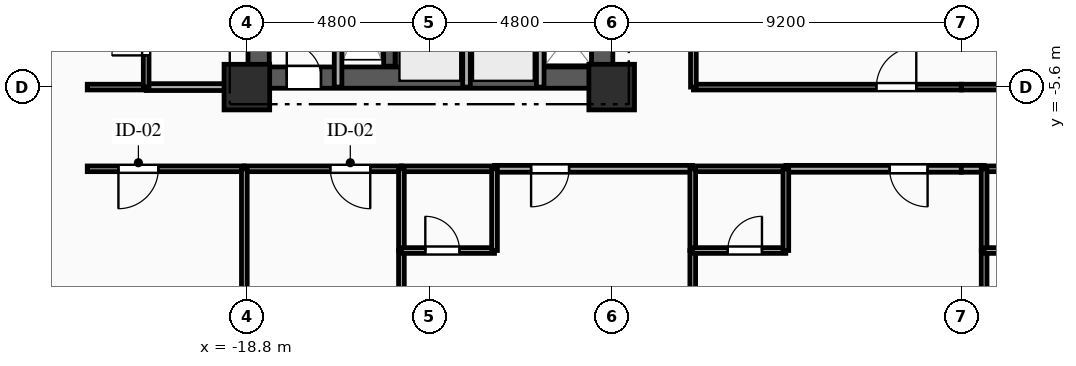
"""IFC4 building model, lengths in metres.
Left out: names, types, materials, properties, quantities, classifications, styles, units other than length and angle.
Written with IfcOpenShell. Run it as: python <this file> out.ifc"""

import sys

from ifc_helpers import new_model, si_unit, direction, frame, frame_2d, origin, origin_2d, place, context, subcontext, project, spatial, rectangle, extrude, element, fill, save


model = new_model("IFC4")
c1 = context("Model", 3, precision=1e-05, world=origin(), true_north=direction((0.0, 1.0)))
c2 = subcontext(c1, "Body", "Model", "MODEL_VIEW")
j1 = project(units=[si_unit("LENGTHUNIT", "METRE"), si_unit("PLANEANGLEUNIT", "RADIAN")], contexts=[c1])
p1 = place(None, origin())
s1 = spatial("IfcSite", under=j1, at=p1, CompositionType="ELEMENT")
p2 = place(p1, origin())
s2 = spatial("IfcBuilding", under=s1, at=p2, CompositionType="ELEMENT")
p3 = place(p2, frame((0.0, 0.0, 37.05)))
s3 = spatial("IfcBuildingStorey", under=s2, at=p3, CompositionType="ELEMENT", Elevation=37.05)
for number, where, z_axis, x_axis in (
    (1, (-18.8, -5.6, 0.0), (0.0, 0.0, 1.0), (1.0, 0.0, 0.0)),
    (2, (-9.2, -5.6, 0.0), (0.0, 0.0, 1.0), (1.0, 0.0, 0.0)),
):
    element("IfcColumn", number, at=place(p3, frame(where, z_axis=z_axis, x_axis=x_axis)), inside=s3, PredefinedType="COLUMN", context=c2, shape_type="SweptSolid", body=[
        extrude(rectangle(XDim=1.2, YDim=1.2, at=origin_2d()), origin(), (0.0, 0.0, 1.0), 3.35),
    ])
p4 = place(p3, frame((-18.8, -5.35, 0.0), z_axis=(0.0, 0.0, 1.0), x_axis=(1.0, 0.0, 0.0)))
e3 = element("IfcWall", 3, at=p4, inside=s3, PredefinedType="SHEAR", context=c2, shape_type="SweptSolid", body=[
    extrude(rectangle(XDim=9.6, YDim=0.56, at=frame_2d((4.8, 0.0))), origin(), (0.0, 0.0, 1.0), 3.035),
])
p5 = place(p4, frame((1.05, 0.0, 0.0)))
e4 = element("IfcOpeningElement", 4, at=p5, cuts=e3, PredefinedType="OPENING", context=c2, shape_type="SweptSolid", body=[
    extrude(rectangle(XDim=0.9, YDim=2.1, at=frame_2d((0.45, 1.05))), frame((0.0, 0.29, 0.0), z_axis=(0.0, -1.0, 0.0), x_axis=(1.0, 0.0, 0.0)), (0.0, 0.0, 1.0), 0.58),
])
p6 = place(p3, frame((-18.49, -5.05, 0.0), z_axis=(0.0, 0.0, 1.0), x_axis=(0.0, 1.0, 0.0)))
e5 = element("IfcWall", 5, at=p6, inside=s3, PredefinedType="SHEAR", context=c2, shape_type="SweptSolid", body=[
    extrude(rectangle(XDim=10.1, YDim=0.56, at=frame_2d((5.05, 0.0))), origin(), (0.0, 0.0, 1.0), 3.035),
])
p7 = place(p3, frame((-9.45, -5.05, 0.0), z_axis=(0.0, 0.0, 1.0), x_axis=(0.0, 1.0, 0.0)))
e6 = element("IfcWall", 6, at=p7, inside=s3, PredefinedType="SHEAR", context=c2, shape_type="SweptSolid", body=[
    extrude(rectangle(XDim=10.1, YDim=0.56, at=frame_2d((5.05, 0.0))), origin(), (0.0, 0.0, 1.0), 3.035),
])
p8 = place(p7, frame((7.15, 0.0, 0.0)))
e7 = element("IfcOpeningElement", 7, at=p8, cuts=e6, PredefinedType="OPENING", context=c2, shape_type="SweptSolid", body=[
    extrude(rectangle(XDim=0.9, YDim=2.1, at=frame_2d((0.45, 1.05))), frame((0.0, 0.29, 0.0), z_axis=(0.0, -1.0, 0.0), x_axis=(1.0, 0.0, 0.0)), (0.0, 0.0, 1.0), 0.58),
])
p9 = place(p7, frame((2.4, 0.0, 0.0)))
e8 = element("IfcOpeningElement", 8, at=p9, cuts=e6, PredefinedType="OPENING", context=c2, shape_type="SweptSolid", body=[
    extrude(rectangle(XDim=1.2, YDim=2.15, at=frame_2d((0.6, 1.075))), frame((0.0, 0.29, 0.0), z_axis=(0.0, -1.0, 0.0), x_axis=(1.0, 0.0, 0.0)), (0.0, 0.0, 1.0), 0.58),
])
p10 = place(p3, frame((-15.05, -5.05, 0.0), z_axis=(0.0, 0.0, 1.0), x_axis=(0.0, 1.0, 0.0)))
e9 = element("IfcWall", 9, at=p10, inside=s3, PredefinedType="SHEAR", context=c2, shape_type="SweptSolid", body=[
    extrude(rectangle(XDim=10.1, YDim=0.3, at=frame_2d((5.05, 0.0))), origin(), (0.0, 0.0, 1.0), 3.035),
])
p11 = place(p3, frame((-16.4, -5.6, 0.0), z_axis=(0.0, 0.0, 1.0), x_axis=(0.0, 1.0, 0.0)))
e10 = element("IfcWall", 10, at=p11, inside=s3, PredefinedType="PARTITIONING", context=c2, shape_type="SweptSolid", body=[
    extrude(rectangle(XDim=3.49, YDim=0.2, at=frame_2d((1.745, 0.0))), origin(), (0.0, 0.0, 1.0), 3.035),
])
for number, where, z_axis, x_axis in (
    (11, (-13.02, -5.6, 0.0), (0.0, 0.0, 1.0), (0.0, 1.0, 0.0)),
    (12, (-11.08, -5.6, 0.0), (0.0, 0.0, 1.0), (0.0, 1.0, 0.0)),
):
    element("IfcWall", number, at=place(p3, frame(where, z_axis=z_axis, x_axis=x_axis)), inside=s3, PredefinedType="PARTITIONING", context=c2, shape_type="SweptSolid", body=[
        extrude(rectangle(XDim=2.25, YDim=0.2, at=frame_2d((1.125, 0.0))), origin(), (0.0, 0.0, 1.0), 3.035),
    ])
p12 = place(p3, frame((-21.45, -5.6, 0.0), z_axis=(0.0, 0.0, 1.0), x_axis=(1.0, 0.0, 0.0)))
e13 = element("IfcWall", 13, at=p12, inside=s3, PredefinedType="PARTITIONING", context=c2, shape_type="SweptSolid", body=[
    extrude(rectangle(XDim=2.65, YDim=0.18, at=frame_2d((1.325, 0.0))), origin(), (0.0, 0.0, 1.0), 3.035),
])
p13 = place(p3, frame((-23.0, -5.6, 0.0), z_axis=(0.0, 0.0, 1.0), x_axis=(1.0, 0.0, 0.0)))
e14 = element("IfcWall", 14, at=p13, inside=s3, PredefinedType="PLUMBINGWALL", context=c2, shape_type="SweptSolid", body=[
    extrude(rectangle(XDim=1.55, YDim=0.15, at=frame_2d((0.775, 0.0))), origin(), (0.0, 0.0, 1.0), 3.035),
])
p14 = place(p3, frame((-18.866, -7.75, 0.0), z_axis=(0.0, 0.0, 1.0), x_axis=(-1.0, 0.0, 0.0)))
e15 = element("IfcWall", 15, at=p14, inside=s3, PredefinedType="PARTITIONING", context=c2, shape_type="SweptSolid", body=[
    extrude(rectangle(XDim=4.134, YDim=0.15, at=frame_2d((2.067, 0.0))), origin(), (0.0, 0.0, 1.0), 3.035),
])
p15 = place(p14, frame((2.263, 0.0, 0.0)))
e16 = element("IfcOpeningElement", 16, at=p15, cuts=e15, PredefinedType="OPENING", context=c2, shape_type="SweptSolid", body=[
    extrude(rectangle(XDim=1.05, YDim=2.15, at=frame_2d((0.525, 1.075))), frame((0.0, 0.085, 0.0), z_axis=(0.0, -1.0, 0.0), x_axis=(1.0, 0.0, 0.0)), (0.0, 0.0, 1.0), 0.17),
])
p16 = place(p3, frame((-14.733, -7.75, 0.0), z_axis=(0.0, 0.0, 1.0), x_axis=(-1.0, 0.0, 0.0)))
e17 = element("IfcWall", 17, at=p16, inside=s3, PredefinedType="PARTITIONING", context=c2, shape_type="SweptSolid", body=[
    extrude(rectangle(XDim=4.134, YDim=0.15, at=frame_2d((2.067, 0.0))), origin(), (0.0, 0.0, 1.0), 3.035),
])
p17 = place(p16, frame((0.82, 0.0, 0.0)))
e18 = element("IfcOpeningElement", 18, at=p17, cuts=e17, PredefinedType="OPENING", context=c2, shape_type="SweptSolid", body=[
    extrude(rectangle(XDim=1.05, YDim=2.15, at=frame_2d((0.525, 1.075))), frame((0.0, 0.085, 0.0), z_axis=(0.0, -1.0, 0.0), x_axis=(1.0, 0.0, 0.0)), (0.0, 0.0, 1.0), 0.17),
])
p18 = place(p3, frame((-7.067, -7.75, 0.0), z_axis=(0.0, 0.0, 1.0), x_axis=(-1.0, 0.0, 0.0)))
e19 = element("IfcWall", 19, at=p18, inside=s3, PredefinedType="PARTITIONING", context=c2, shape_type="SweptSolid", body=[
    extrude(rectangle(XDim=5.216, YDim=0.18, at=frame_2d((2.608, 0.0))), origin(), (0.0, 0.0, 1.0), 3.035),
])
p19 = place(p18, frame((3.254, 0.0, 0.0)))
e20 = element("IfcOpeningElement", 20, at=p19, cuts=e19, PredefinedType="OPENING", context=c2, shape_type="SweptSolid", body=[
    extrude(rectangle(XDim=1.0, YDim=2.15, at=frame_2d((0.5, 1.075))), frame((0.0, 0.1, 0.0), z_axis=(0.0, -1.0, 0.0), x_axis=(1.0, 0.0, 0.0)), (0.0, 0.0, 1.0), 0.2),
])
p20 = place(p3, frame((-12.283, -7.75, 0.0), z_axis=(0.0, 0.0, 1.0), x_axis=(-1.0, 0.0, 0.0)))
e21 = element("IfcWall", 21, at=p20, inside=s3, PredefinedType="PLUMBINGWALL", context=c2, shape_type="SweptSolid", body=[
    extrude(rectangle(XDim=2.45, YDim=0.15, at=frame_2d((1.225, 0.0))), origin(), (0.0, 0.0, 1.0), 3.035),
])
p21 = place(p3, frame((0.0, -7.75, 0.0), z_axis=(0.0, 0.0, 1.0), x_axis=(-1.0, 0.0, 0.0)))
e22 = element("IfcWall", 22, at=p21, inside=s3, PredefinedType="PARTITIONING", context=c2, shape_type="SweptSolid", body=[
    extrude(rectangle(XDim=4.617, YDim=0.18, at=frame_2d((2.309, 0.0))), origin(), (0.0, 0.0, 1.0), 3.035),
])
p22 = place(p21, frame((0.887, 0.0, 0.0)))
e23 = element("IfcOpeningElement", 23, at=p22, cuts=e22, PredefinedType="OPENING", context=c2, shape_type="SweptSolid", body=[
    extrude(rectangle(XDim=1.0, YDim=2.15, at=frame_2d((0.5, 1.075))), frame((0.0, 0.1, 0.0), z_axis=(0.0, -1.0, 0.0), x_axis=(1.0, 0.0, 0.0)), (0.0, 0.0, 1.0), 0.2),
])
p23 = place(p3, frame((-4.617, -7.75, 0.0), z_axis=(0.0, 0.0, 1.0), x_axis=(-1.0, 0.0, 0.0)))
e24 = element("IfcWall", 24, at=p23, inside=s3, PredefinedType="PLUMBINGWALL", context=c2, shape_type="SweptSolid", body=[
    extrude(rectangle(XDim=2.45, YDim=0.15, at=frame_2d((1.225, 0.0))), origin(), (0.0, 0.0, 1.0), 3.035),
])
p24 = place(p3, frame((-7.05, -5.6, 0.0), z_axis=(0.0, 0.0, 1.0), x_axis=(1.0, 0.0, 0.0)))
e25 = element("IfcWall", 25, at=p24, inside=s3, PredefinedType="PARTITIONING", context=c2, shape_type="SweptSolid", body=[
    extrude(rectangle(XDim=7.05, YDim=0.15, at=frame_2d((3.525, 0.0))), origin(), (0.0, 0.0, 1.0), 2.52),
])
p25 = place(p24, frame((4.815, 0.0, 0.0)))
e26 = element("IfcOpeningElement", 26, at=p25, cuts=e25, PredefinedType="OPENING", context=c2, shape_type="SweptSolid", body=[
    extrude(rectangle(XDim=1.05, YDim=2.15, at=frame_2d((0.525, 1.075))), frame((0.0, 0.085, 0.0), z_axis=(0.0, -1.0, 0.0), x_axis=(1.0, 0.0, 0.0)), (0.0, 0.0, 1.0), 0.17),
])
p26 = place(p3, frame((0.6, -7.75, 0.0), z_axis=(0.0, 0.0, 1.0), x_axis=(-1.0, 0.0, 0.0)))
e27 = element("IfcWall", 27, at=p26, inside=s3, PredefinedType="PARTITIONING", context=c2, shape_type="SweptSolid", body=[
    extrude(rectangle(XDim=0.6, YDim=0.18, at=frame_2d((0.3, 0.0))), origin(), (0.0, 0.0, 1.0), 3.035),
])
p27 = place(p3, frame((3.05, -7.75, 0.0), z_axis=(0.0, 0.0, 1.0), x_axis=(-1.0, 0.0, 0.0)))
e28 = element("IfcWall", 28, at=p27, inside=s3, PredefinedType="PLUMBINGWALL", context=c2, shape_type="SweptSolid", body=[
    extrude(rectangle(XDim=2.45, YDim=0.15, at=frame_2d((1.225, 0.0))), origin(), (0.0, 0.0, 1.0), 3.035),
])
p28 = place(p3, frame((0.0, -5.6, 0.0), z_axis=(0.0, 0.0, 1.0), x_axis=(1.0, 0.0, 0.0)))
e29 = element("IfcWall", 29, at=p28, inside=s3, PredefinedType="PARTITIONING", context=c2, shape_type="SweptSolid", body=[
    extrude(rectangle(XDim=7.05, YDim=0.15, at=frame_2d((3.525, 0.0))), origin(), (0.0, 0.0, 1.0), 2.52),
])
p29 = place(p3, frame((-7.05, 1.45, 0.0), z_axis=(0.0, 0.0, 1.0), x_axis=(0.0, -1.0, 0.0)))
e30 = element("IfcWall", 30, at=p29, inside=s3, PredefinedType="PARTITIONING", context=c2, shape_type="SweptSolid", body=[
    extrude(rectangle(XDim=7.05, YDim=0.15, at=frame_2d((3.525, 0.0))), origin(), (0.0, 0.0, 1.0), 3.035),
])
p30 = place(p3, frame((-21.45, -5.6, 0.0), z_axis=(0.0, 0.0, 1.0), x_axis=(0.0, 1.0, 0.0)))
e31 = element("IfcWall", 31, at=p30, inside=s3, PredefinedType="PLUMBINGWALL", context=c2, shape_type="SweptSolid", body=[
    extrude(rectangle(XDim=2.35, YDim=0.15, at=frame_2d((1.175, 0.0))), origin(), (0.0, 0.0, 1.0), 3.035),
])
p31 = place(p30, frame((0.834, 0.0, 0.0)))
e32 = element("IfcOpeningElement", 32, at=p31, cuts=e31, PredefinedType="OPENING", context=c2, shape_type="SweptSolid", body=[
    extrude(rectangle(XDim=0.9, YDim=2.1, at=frame_2d((0.45, 1.05))), frame((0.0, 0.085, 0.0), z_axis=(0.0, -1.0, 0.0), x_axis=(1.0, 0.0, 0.0)), (0.0, 0.0, 1.0), 0.17),
])
p32 = place(p3, frame((-18.866, -7.75, 0.0), z_axis=(0.0, 0.0, 1.0), x_axis=(0.0, -1.0, 0.0)))
e33 = element("IfcWall", 33, at=p32, inside=s3, PredefinedType="PARTITIONING", context=c2, shape_type="SweptSolid", body=[
    extrude(rectangle(XDim=11.65, YDim=0.15, at=frame_2d((5.825, 0.0))), origin(), (0.0, 0.0, 1.0), 2.52),
])
p33 = place(p3, frame((-14.733, -9.9, 0.0), z_axis=(0.0, 0.0, 1.0), x_axis=(0.0, -1.0, 0.0)))
e34 = element("IfcWall", 34, at=p33, inside=s3, PredefinedType="PARTITIONING", context=c2, shape_type="SweptSolid", body=[
    extrude(rectangle(XDim=9.5, YDim=0.15, at=frame_2d((4.75, 0.0))), origin(), (0.0, 0.0, 1.0), 3.035),
])
p34 = place(p3, frame((-14.733, -7.75, 0.0), z_axis=(0.0, 0.0, 1.0), x_axis=(0.0, -1.0, 0.0)))
e35 = element("IfcWall", 35, at=p34, inside=s3, PredefinedType="PLUMBINGWALL", context=c2, shape_type="SweptSolid", body=[
    extrude(rectangle(XDim=2.15, YDim=0.15, at=frame_2d((1.075, 0.0))), origin(), (0.0, 0.0, 1.0), 3.035),
])
p35 = place(p3, frame((-14.733, -9.9, 0.0), z_axis=(0.0, 0.0, 1.0), x_axis=(1.0, 0.0, 0.0)))
e36 = element("IfcWall", 36, at=p35, inside=s3, PredefinedType="PLUMBINGWALL", context=c2, shape_type="SweptSolid", body=[
    extrude(rectangle(XDim=2.45, YDim=0.15, at=frame_2d((1.225, 0.0))), origin(), (0.0, 0.0, 1.0), 3.035),
])
p36 = place(p35, frame((0.629, 0.0, 0.0)))
e37 = element("IfcOpeningElement", 37, at=p36, cuts=e36, PredefinedType="OPENING", context=c2, shape_type="SweptSolid", body=[
    extrude(rectangle(XDim=0.9, YDim=2.1, at=frame_2d((0.45, 1.05))), frame((0.0, 0.085, 0.0), z_axis=(0.0, -1.0, 0.0), x_axis=(1.0, 0.0, 0.0)), (0.0, 0.0, 1.0), 0.17),
])
p37 = place(p3, frame((-12.283, -9.9, 0.0), z_axis=(0.0, 0.0, 1.0), x_axis=(0.0, 1.0, 0.0)))
e38 = element("IfcWall", 38, at=p37, inside=s3, PredefinedType="PLUMBINGWALL", context=c2, shape_type="SweptSolid", body=[
    extrude(rectangle(XDim=2.15, YDim=0.15, at=frame_2d((1.075, 0.0))), origin(), (0.0, 0.0, 1.0), 3.035),
])
p38 = place(p3, frame((-7.067, -9.9, 0.0), z_axis=(0.0, 0.0, 1.0), x_axis=(0.0, -1.0, 0.0)))
e39 = element("IfcWall", 39, at=p38, inside=s3, PredefinedType="PARTITIONING", context=c2, shape_type="SweptSolid", body=[
    extrude(rectangle(XDim=9.5, YDim=0.15, at=frame_2d((4.75, 0.0))), origin(), (0.0, 0.0, 1.0), 3.035),
])
p39 = place(p3, frame((-7.067, -7.75, 0.0), z_axis=(0.0, 0.0, 1.0), x_axis=(0.0, -1.0, 0.0)))
e40 = element("IfcWall", 40, at=p39, inside=s3, PredefinedType="PLUMBINGWALL", context=c2, shape_type="SweptSolid", body=[
    extrude(rectangle(XDim=2.15, YDim=0.15, at=frame_2d((1.075, 0.0))), origin(), (0.0, 0.0, 1.0), 3.035),
])
p40 = place(p3, frame((-7.067, -9.9, 0.0), z_axis=(0.0, 0.0, 1.0), x_axis=(1.0, 0.0, 0.0)))
e41 = element("IfcWall", 41, at=p40, inside=s3, PredefinedType="PLUMBINGWALL", context=c2, shape_type="SweptSolid", body=[
    extrude(rectangle(XDim=2.45, YDim=0.15, at=frame_2d((1.225, 0.0))), origin(), (0.0, 0.0, 1.0), 3.035),
])
p41 = place(p40, frame((0.921, 0.0, 0.0)))
e42 = element("IfcOpeningElement", 42, at=p41, cuts=e41, PredefinedType="OPENING", context=c2, shape_type="SweptSolid", body=[
    extrude(rectangle(XDim=0.9, YDim=2.1, at=frame_2d((0.45, 1.05))), frame((0.0, 0.085, 0.0), z_axis=(0.0, -1.0, 0.0), x_axis=(1.0, 0.0, 0.0)), (0.0, 0.0, 1.0), 0.17),
])
p42 = place(p3, frame((-4.617, -9.9, 0.0), z_axis=(0.0, 0.0, 1.0), x_axis=(0.0, 1.0, 0.0)))
e43 = element("IfcWall", 43, at=p42, inside=s3, PredefinedType="PLUMBINGWALL", context=c2, shape_type="SweptSolid", body=[
    extrude(rectangle(XDim=2.15, YDim=0.15, at=frame_2d((1.075, 0.0))), origin(), (0.0, 0.0, 1.0), 3.035),
])
p43 = place(p3, frame((0.6, -9.9, 0.0), z_axis=(0.0, 0.0, 1.0), x_axis=(0.0, -1.0, 0.0)))
e44 = element("IfcWall", 44, at=p43, inside=s3, PredefinedType="PARTITIONING", context=c2, shape_type="SweptSolid", body=[
    extrude(rectangle(XDim=9.5, YDim=0.15, at=frame_2d((4.75, 0.0))), origin(), (0.0, 0.0, 1.0), 3.035),
])
p44 = place(p3, frame((0.6, -7.75, 0.0), z_axis=(0.0, 0.0, 1.0), x_axis=(0.0, -1.0, 0.0)))
e45 = element("IfcWall", 45, at=p44, inside=s3, PredefinedType="PLUMBINGWALL", context=c2, shape_type="SweptSolid", body=[
    extrude(rectangle(XDim=2.15, YDim=0.15, at=frame_2d((1.075, 0.0))), origin(), (0.0, 0.0, 1.0), 3.035),
])
p45 = place(p3, frame((0.6, -9.9, 0.0), z_axis=(0.0, 0.0, 1.0), x_axis=(1.0, 0.0, 0.0)))
e46 = element("IfcWall", 46, at=p45, inside=s3, PredefinedType="PLUMBINGWALL", context=c2, shape_type="SweptSolid", body=[
    extrude(rectangle(XDim=2.45, YDim=0.15, at=frame_2d((1.225, 0.0))), origin(), (0.0, 0.0, 1.0), 3.035),
])
p46 = place(p45, frame((0.629, 0.0, 0.0)))
e47 = element("IfcOpeningElement", 47, at=p46, cuts=e46, PredefinedType="OPENING", context=c2, shape_type="SweptSolid", body=[
    extrude(rectangle(XDim=0.9, YDim=2.1, at=frame_2d((0.45, 1.05))), frame((0.0, 0.085, 0.0), z_axis=(0.0, -1.0, 0.0), x_axis=(1.0, 0.0, 0.0)), (0.0, 0.0, 1.0), 0.17),
])
p47 = place(p5, origin())
e48 = element("IfcDoor", 48, at=p47, inside=s3, OperationType="SINGLE_SWING_LEFT", PredefinedType="DOOR", context=c2, shape_type="SweptSolid", body=[
    extrude(rectangle(XDim=0.9, YDim=2.1, at=frame_2d((0.45, 1.05))), frame((0.0, 0.025, 0.0), z_axis=(0.0, -1.0, 0.0), x_axis=(1.0, 0.0, 0.0)), (0.0, 0.0, 1.0), 0.05),
])
fill(e4, e48)
p48 = place(p15, origin())
e49 = element("IfcDoor", 49, at=p48, inside=s3, OperationType="SINGLE_SWING_RIGHT", PredefinedType="DOOR", context=c2, shape_type="SweptSolid", body=[
    extrude(rectangle(XDim=1.05, YDim=2.15, at=frame_2d((0.525, 1.075))), frame((0.0, 0.025, 0.0), z_axis=(0.0, -1.0, 0.0), x_axis=(1.0, 0.0, 0.0)), (0.0, 0.0, 1.0), 0.05),
])
fill(e16, e49)
p49 = place(p17, origin())
e50 = element("IfcDoor", 50, at=p49, inside=s3, OperationType="SINGLE_SWING_LEFT", PredefinedType="DOOR", context=c2, shape_type="SweptSolid", body=[
    extrude(rectangle(XDim=1.05, YDim=2.15, at=frame_2d((0.525, 1.075))), frame((0.0, 0.025, 0.0), z_axis=(0.0, -1.0, 0.0), x_axis=(1.0, 0.0, 0.0)), (0.0, 0.0, 1.0), 0.05),
])
fill(e18, e50)
p50 = place(p19, origin())
e51 = element("IfcDoor", 51, at=p50, inside=s3, OperationType="SINGLE_SWING_RIGHT", PredefinedType="DOOR", context=c2, shape_type="SweptSolid", body=[
    extrude(rectangle(XDim=1.0, YDim=2.15, at=frame_2d((0.5, 1.075))), frame((0.0, 0.025, 0.0), z_axis=(0.0, -1.0, 0.0), x_axis=(1.0, 0.0, 0.0)), (0.0, 0.0, 1.0), 0.05),
])
fill(e20, e51)
p51 = place(p22, origin())
e52 = element("IfcDoor", 52, at=p51, inside=s3, OperationType="SINGLE_SWING_LEFT", PredefinedType="DOOR", context=c2, shape_type="SweptSolid", body=[
    extrude(rectangle(XDim=1.0, YDim=2.15, at=frame_2d((0.5, 1.075))), frame((0.0, 0.025, 0.0), z_axis=(0.0, -1.0, 0.0), x_axis=(1.0, 0.0, 0.0)), (0.0, 0.0, 1.0), 0.05),
])
fill(e23, e52)
p52 = place(p25, origin())
e53 = element("IfcDoor", 53, at=p52, inside=s3, OperationType="SINGLE_SWING_RIGHT", PredefinedType="DOOR", context=c2, shape_type="SweptSolid", body=[
    extrude(rectangle(XDim=1.05, YDim=2.15, at=frame_2d((0.525, 1.075))), frame((0.0, 0.025, 0.0), z_axis=(0.0, -1.0, 0.0), x_axis=(1.0, 0.0, 0.0)), (0.0, 0.0, 1.0), 0.05),
])
fill(e26, e53)
p53 = place(p31, origin())
e54 = element("IfcDoor", 54, at=p53, inside=s3, OperationType="SINGLE_SWING_LEFT", PredefinedType="DOOR", context=c2, shape_type="SweptSolid", body=[
    extrude(rectangle(XDim=0.9, YDim=2.1, at=frame_2d((0.45, 1.05))), frame((0.0, 0.025, 0.0), z_axis=(0.0, -1.0, 0.0), x_axis=(1.0, 0.0, 0.0)), (0.0, 0.0, 1.0), 0.05),
])
fill(e32, e54)
p54 = place(p36, origin())
e55 = element("IfcDoor", 55, at=p54, inside=s3, OperationType="SINGLE_SWING_LEFT", PredefinedType="DOOR", context=c2, shape_type="SweptSolid", body=[
    extrude(rectangle(XDim=0.9, YDim=2.1, at=frame_2d((0.45, 1.05))), frame((0.0, 0.025, 0.0), z_axis=(0.0, -1.0, 0.0), x_axis=(1.0, 0.0, 0.0)), (0.0, 0.0, 1.0), 0.05),
])
fill(e37, e55)
p55 = place(p41, origin())
e56 = element("IfcDoor", 56, at=p55, inside=s3, OperationType="SINGLE_SWING_RIGHT", PredefinedType="DOOR", context=c2, shape_type="SweptSolid", body=[
    extrude(rectangle(XDim=0.9, YDim=2.1, at=frame_2d((0.45, 1.05))), frame((0.0, 0.025, 0.0), z_axis=(0.0, -1.0, 0.0), x_axis=(1.0, 0.0, 0.0)), (0.0, 0.0, 1.0), 0.05),
])
fill(e42, e56)
save(model, sys.argv[1])
